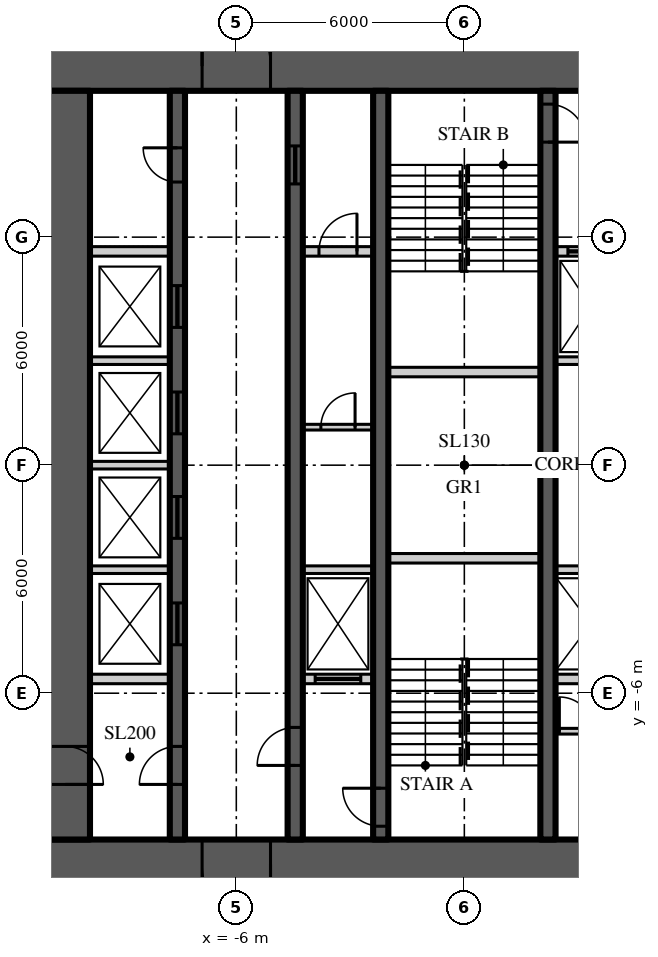
"""IFC4 building model, lengths in metres.
Left out: names, types, materials, properties, quantities, classifications, styles, units other than length and angle.
Written with IfcOpenShell. Run it as: python <this file> out.ifc"""

import sys

from ifc_helpers import new_model, si_unit, direction, frame, frame_2d, origin, place, context, subcontext, project, spatial, rectangle, extrude, element, fill, save


model = new_model("IFC4")
c1 = context("Model", 3, precision=1e-05, world=origin(), true_north=direction((0.0, 1.0)))
c2 = subcontext(c1, "Body", "Model", "MODEL_VIEW")
j1 = project(units=[si_unit("LENGTHUNIT", "METRE"), si_unit("PLANEANGLEUNIT", "RADIAN")], contexts=[c1])
p1 = place(None, origin())
s1 = spatial("IfcSite", under=j1, at=p1, CompositionType="ELEMENT")
p2 = place(p1, origin())
s2 = spatial("IfcBuilding", under=s1, at=p2, CompositionType="ELEMENT")
p3 = place(p2, frame((0.0, 0.0, 51.3)))
s3 = spatial("IfcBuildingStorey", under=s2, at=p3, CompositionType="ELEMENT", Elevation=51.3)
p4 = place(p3, frame((-11.15, 10.5, 0.0), z_axis=(0.0, 0.0, 1.0), x_axis=(1.0, 0.0, 0.0)))
e1 = element("IfcWall", 1, at=p4, inside=s3, PredefinedType="SHEAR", context=c2, shape_type="SweptSolid", body=[
    extrude(rectangle(XDim=22.3, YDim=1.3, at=frame_2d((11.15, 0.0))), origin(), (0.0, 0.0, 1.0), 3.9),
])
p5 = place(p4, frame((4.25, 0.0, 0.0)))
e2 = element("IfcOpeningElement", 2, at=p5, cuts=e1, PredefinedType="OPENING", context=c2, shape_type="SweptSolid", body=[
    extrude(rectangle(XDim=1.8, YDim=2.2, at=frame_2d((0.9, 1.1))), frame((0.0, 0.66, 0.0), z_axis=(0.0, -1.0, 0.0), x_axis=(1.0, 0.0, 0.0)), (0.0, 0.0, 1.0), 1.32),
])
p6 = place(p4, frame((16.25, 0.0, 0.0)))
e3 = element("IfcOpeningElement", 3, at=p6, cuts=e1, PredefinedType="OPENING", context=c2, shape_type="SweptSolid", body=[
    extrude(rectangle(XDim=1.8, YDim=2.2, at=frame_2d((0.9, 1.1))), frame((0.0, 0.66, 0.0), z_axis=(0.0, -1.0, 0.0), x_axis=(1.0, 0.0, 0.0)), (0.0, 0.0, 1.0), 1.32),
])
p7 = place(p3, frame((11.15, -10.5, 0.0), z_axis=(0.0, 0.0, 1.0), x_axis=(-1.0, 0.0, 0.0)))
e4 = element("IfcWall", 4, at=p7, inside=s3, PredefinedType="SHEAR", context=c2, shape_type="SweptSolid", body=[
    extrude(rectangle(XDim=22.3, YDim=1.3, at=frame_2d((11.15, 0.0))), origin(), (0.0, 0.0, 1.0), 3.9),
])
p8 = place(p7, frame((16.25, 0.0, 0.0)))
e5 = element("IfcOpeningElement", 5, at=p8, cuts=e4, PredefinedType="OPENING", context=c2, shape_type="SweptSolid", body=[
    extrude(rectangle(XDim=1.8, YDim=2.2, at=frame_2d((0.9, 1.1))), frame((0.0, 0.66, 0.0), z_axis=(0.0, -1.0, 0.0), x_axis=(1.0, 0.0, 0.0)), (0.0, 0.0, 1.0), 1.32),
])
p9 = place(p7, frame((4.25, 0.0, 0.0)))
e6 = element("IfcOpeningElement", 6, at=p9, cuts=e4, PredefinedType="OPENING", context=c2, shape_type="SweptSolid", body=[
    extrude(rectangle(XDim=1.8, YDim=2.2, at=frame_2d((0.9, 1.1))), frame((0.0, 0.66, 0.0), z_axis=(0.0, -1.0, 0.0), x_axis=(1.0, 0.0, 0.0)), (0.0, 0.0, 1.0), 1.32),
])
p10 = place(p3, frame((-10.5, 9.85, 0.0), z_axis=(0.0, 0.0, 1.0), x_axis=(0.0, -1.0, 0.0)))
e7 = element("IfcWall", 7, at=p10, inside=s3, PredefinedType="SHEAR", context=c2, shape_type="SweptSolid", body=[
    extrude(rectangle(XDim=19.7, YDim=1.3, at=frame_2d((9.85, 0.0))), origin(), (0.0, 0.0, 1.0), 3.9),
])
p11 = place(p10, frame((17.25, 0.0, 0.0)))
e8 = element("IfcOpeningElement", 8, at=p11, cuts=e7, PredefinedType="OPENING", context=c2, shape_type="SweptSolid", body=[
    extrude(rectangle(XDim=1.0, YDim=2.2, at=frame_2d((0.5, 1.1))), frame((0.0, 0.66, 0.0), z_axis=(0.0, -1.0, 0.0), x_axis=(1.0, 0.0, 0.0)), (0.0, 0.0, 1.0), 1.32),
])
p12 = place(p3, frame((-7.55, -9.85, 0.0), z_axis=(0.0, 0.0, 1.0), x_axis=(0.0, 1.0, 0.0)))
e9 = element("IfcWall", 9, at=p12, inside=s3, PredefinedType="SHEAR", context=c2, shape_type="SweptSolid", body=[
    extrude(rectangle(XDim=19.7, YDim=0.4, at=frame_2d((9.85, 0.0))), origin(), (0.0, 0.0, 1.0), 3.9),
])
p13 = place(p12, frame((1.45, 0.0, 0.0)))
e10 = element("IfcOpeningElement", 10, at=p13, cuts=e9, PredefinedType="OPENING", context=c2, shape_type="SweptSolid", body=[
    extrude(rectangle(XDim=1.0, YDim=2.2, at=frame_2d((0.5, 1.1))), frame((0.0, 0.21, 0.0), z_axis=(0.0, -1.0, 0.0), x_axis=(1.0, 0.0, 0.0)), (0.0, 0.0, 1.0), 0.42),
])
p14 = place(p12, frame((17.3, 0.0, 0.0)))
e11 = element("IfcOpeningElement", 11, at=p14, cuts=e9, PredefinedType="OPENING", context=c2, shape_type="SweptSolid", body=[
    extrude(rectangle(XDim=0.9, YDim=2.1, at=frame_2d((0.45, 1.05))), frame((0.0, 0.21, 0.0), z_axis=(0.0, -1.0, 0.0), x_axis=(1.0, 0.0, 0.0)), (0.0, 0.0, 1.0), 0.42),
])
p15 = place(p12, frame((5.125, 0.0, 0.0)))
e12 = element("IfcOpeningElement", 12, at=p15, cuts=e9, PredefinedType="OPENING", context=c2, shape_type="SweptSolid", body=[
    extrude(rectangle(XDim=1.1, YDim=2.2, at=frame_2d((0.55, 1.1))), frame((0.0, 0.21, 0.0), z_axis=(0.0, -1.0, 0.0), x_axis=(1.0, 0.0, 0.0)), (0.0, 0.0, 1.0), 0.42),
])
p16 = place(p12, frame((7.925, 0.0, 0.0)))
e13 = element("IfcOpeningElement", 13, at=p16, cuts=e9, PredefinedType="OPENING", context=c2, shape_type="SweptSolid", body=[
    extrude(rectangle(XDim=1.1, YDim=2.2, at=frame_2d((0.55, 1.1))), frame((0.0, 0.21, 0.0), z_axis=(0.0, -1.0, 0.0), x_axis=(1.0, 0.0, 0.0)), (0.0, 0.0, 1.0), 0.42),
])
p17 = place(p12, frame((10.675, 0.0, 0.0)))
e14 = element("IfcOpeningElement", 14, at=p17, cuts=e9, PredefinedType="OPENING", context=c2, shape_type="SweptSolid", body=[
    extrude(rectangle(XDim=1.1, YDim=2.2, at=frame_2d((0.55, 1.1))), frame((0.0, 0.21, 0.0), z_axis=(0.0, -1.0, 0.0), x_axis=(1.0, 0.0, 0.0)), (0.0, 0.0, 1.0), 0.42),
])
p18 = place(p12, frame((13.475, 0.0, 0.0)))
e15 = element("IfcOpeningElement", 15, at=p18, cuts=e9, PredefinedType="OPENING", context=c2, shape_type="SweptSolid", body=[
    extrude(rectangle(XDim=1.1, YDim=2.2, at=frame_2d((0.55, 1.1))), frame((0.0, 0.21, 0.0), z_axis=(0.0, -1.0, 0.0), x_axis=(1.0, 0.0, 0.0)), (0.0, 0.0, 1.0), 0.42),
])
p19 = place(p3, frame((-4.45, -9.85, 0.0), z_axis=(0.0, 0.0, 1.0), x_axis=(0.0, 1.0, 0.0)))
e16 = element("IfcWall", 16, at=p19, inside=s3, PredefinedType="SHEAR", context=c2, shape_type="SweptSolid", body=[
    extrude(rectangle(XDim=19.7, YDim=0.4, at=frame_2d((9.85, 0.0))), origin(), (0.0, 0.0, 1.0), 3.9),
])
p20 = place(p19, frame((1.95, 0.0, 0.0)))
e17 = element("IfcOpeningElement", 17, at=p20, cuts=e16, PredefinedType="OPENING", context=c2, shape_type="SweptSolid", body=[
    extrude(rectangle(XDim=1.0, YDim=2.2, at=frame_2d((0.5, 1.1))), frame((0.0, 0.21, 0.0), z_axis=(0.0, -1.0, 0.0), x_axis=(1.0, 0.0, 0.0)), (0.0, 0.0, 1.0), 0.42),
])
p21 = place(p19, frame((17.25, 0.0, 0.0)))
e18 = element("IfcOpeningElement", 18, at=p21, cuts=e16, PredefinedType="OPENING", context=c2, shape_type="SweptSolid", body=[
    extrude(rectangle(XDim=1.0, YDim=2.1, at=frame_2d((0.5, 1.05))), frame((0.0, 0.21, 0.0), z_axis=(0.0, -1.0, 0.0), x_axis=(1.0, 0.0, 0.0)), (0.0, 0.0, 1.0), 0.42),
])
p22 = place(p3, frame((-2.2, -9.85, 0.0), z_axis=(0.0, 0.0, 1.0), x_axis=(0.0, 1.0, 0.0)))
e19 = element("IfcWall", 19, at=p22, inside=s3, PredefinedType="SHEAR", context=c2, shape_type="SweptSolid", body=[
    extrude(rectangle(XDim=19.7, YDim=0.4, at=frame_2d((9.85, 0.0))), origin(), (0.0, 0.0, 1.0), 3.9),
])
p23 = place(p22, frame((0.35, 0.0, 0.0)))
e20 = element("IfcOpeningElement", 20, at=p23, cuts=e19, PredefinedType="OPENING", context=c2, shape_type="SweptSolid", body=[
    extrude(rectangle(XDim=1.0, YDim=2.2, at=frame_2d((0.5, 1.1))), frame((0.0, 0.21, 0.0), z_axis=(0.0, -1.0, 0.0), x_axis=(1.0, 0.0, 0.0)), (0.0, 0.0, 1.0), 0.42),
])
p24 = place(p3, frame((2.2, 9.85, 0.0), z_axis=(0.0, 0.0, 1.0), x_axis=(0.0, -1.0, 0.0)))
e21 = element("IfcWall", 21, at=p24, inside=s3, PredefinedType="SHEAR", context=c2, shape_type="SweptSolid", body=[
    extrude(rectangle(XDim=19.7, YDim=0.4, at=frame_2d((9.85, 0.0))), origin(), (0.0, 0.0, 1.0), 3.9),
])
p25 = place(p24, frame((0.35, 0.0, 0.0)))
e22 = element("IfcOpeningElement", 22, at=p25, cuts=e21, PredefinedType="OPENING", context=c2, shape_type="SweptSolid", body=[
    extrude(rectangle(XDim=1.0, YDim=2.2, at=frame_2d((0.5, 1.1))), frame((0.0, 0.21, 0.0), z_axis=(0.0, -1.0, 0.0), x_axis=(1.0, 0.0, 0.0)), (0.0, 0.0, 1.0), 0.42),
])
p26 = place(p3, frame((-9.85, 5.625, 0.0), z_axis=(0.0, 0.0, 1.0), x_axis=(1.0, 0.0, 0.0)))
e23 = element("IfcWall", 23, at=p26, inside=s3, PredefinedType="SOLIDWALL", context=c2, shape_type="SweptSolid", body=[
    extrude(rectangle(XDim=2.1, YDim=0.25, at=frame_2d((1.05, 0.0))), origin(), (0.0, 0.0, 1.0), 3.7),
])
p27 = place(p3, frame((-4.25, 5.625, 0.0), z_axis=(0.0, 0.0, 1.0), x_axis=(1.0, 0.0, 0.0)))
e24 = element("IfcWall", 24, at=p27, inside=s3, PredefinedType="SOLIDWALL", context=c2, shape_type="SweptSolid", body=[
    extrude(rectangle(XDim=1.85, YDim=0.25, at=frame_2d((0.925, 0.0))), origin(), (0.0, 0.0, 1.0), 3.7),
])
p28 = place(p27, frame((0.425, 0.0, 0.0)))
e25 = element("IfcOpeningElement", 25, at=p28, cuts=e24, PredefinedType="OPENING", context=c2, shape_type="SweptSolid", body=[
    extrude(rectangle(XDim=1.0, YDim=2.2, at=frame_2d((0.5, 1.1))), frame((0.0, 0.135, 0.0), z_axis=(0.0, -1.0, 0.0), x_axis=(1.0, 0.0, 0.0)), (0.0, 0.0, 1.0), 0.27),
])
p29 = place(p3, frame((2.4, 5.625, 0.0), z_axis=(0.0, 0.0, 1.0), x_axis=(1.0, 0.0, 0.0)))
e26 = element("IfcWall", 26, at=p29, inside=s3, PredefinedType="SOLIDWALL", context=c2, shape_type="SweptSolid", body=[
    extrude(rectangle(XDim=1.85, YDim=0.25, at=frame_2d((0.925, 0.0))), origin(), (0.0, 0.0, 1.0), 3.7),
])
p30 = place(p29, frame((0.325, 0.0, 0.0)))
e27 = element("IfcOpeningElement", 27, at=p30, cuts=e26, PredefinedType="OPENING", context=c2, shape_type="SweptSolid", body=[
    extrude(rectangle(XDim=1.2, YDim=2.2, at=frame_2d((0.6, 1.1))), frame((0.0, 0.135, 0.0), z_axis=(0.0, -1.0, 0.0), x_axis=(1.0, 0.0, 0.0)), (0.0, 0.0, 1.0), 0.27),
])
p31 = place(p3, frame((-9.85, -5.625, 0.0), z_axis=(0.0, 0.0, 1.0), x_axis=(1.0, 0.0, 0.0)))
e28 = element("IfcWall", 28, at=p31, inside=s3, PredefinedType="SOLIDWALL", context=c2, shape_type="SweptSolid", body=[
    extrude(rectangle(XDim=2.1, YDim=0.25, at=frame_2d((1.05, 0.0))), origin(), (0.0, 0.0, 1.0), 3.7),
])
p32 = place(p3, frame((-4.25, -5.625, 0.0), z_axis=(0.0, 0.0, 1.0), x_axis=(1.0, 0.0, 0.0)))
e29 = element("IfcWall", 29, at=p32, inside=s3, PredefinedType="SOLIDWALL", context=c2, shape_type="SweptSolid", body=[
    extrude(rectangle(XDim=1.85, YDim=0.25, at=frame_2d((0.925, 0.0))), origin(), (0.0, 0.0, 1.0), 3.7),
])
p33 = place(p32, frame((0.325, 0.0, 0.0)))
e30 = element("IfcOpeningElement", 30, at=p33, cuts=e29, PredefinedType="OPENING", context=c2, shape_type="SweptSolid", body=[
    extrude(rectangle(XDim=1.2, YDim=2.2, at=frame_2d((0.6, 1.1))), frame((0.0, 0.135, 0.0), z_axis=(0.0, -1.0, 0.0), x_axis=(1.0, 0.0, 0.0)), (0.0, 0.0, 1.0), 0.27),
])
p34 = place(p3, frame((2.4, -5.625, 0.0), z_axis=(0.0, 0.0, 1.0), x_axis=(1.0, 0.0, 0.0)))
e31 = element("IfcWall", 31, at=p34, inside=s3, PredefinedType="SOLIDWALL", context=c2, shape_type="SweptSolid", body=[
    extrude(rectangle(XDim=1.85, YDim=0.25, at=frame_2d((0.925, 0.0))), origin(), (0.0, 0.0, 1.0), 3.7),
])
for number, where, z_axis, x_axis in (
    (32, (-2.0, -2.45, 0.0), (0.0, 0.0, 1.0), (1.0, 0.0, 0.0)),
    (33, (-2.0, 2.45, 0.0), (0.0, 0.0, 1.0), (1.0, 0.0, 0.0)),
):
    element("IfcWall", number, at=place(p3, frame(where, z_axis=z_axis, x_axis=x_axis)), inside=s3, PredefinedType="SOLIDWALL", context=c2, shape_type="SweptSolid", body=[
        extrude(rectangle(XDim=4.0, YDim=0.25, at=frame_2d((2.0, 0.0))), origin(), (0.0, 0.0, 1.0), 3.7),
    ])
p35 = place(p3, frame((-9.85, -2.75, 0.0), z_axis=(0.0, 0.0, 1.0), x_axis=(1.0, 0.0, 0.0)))
e34 = element("IfcWall", 34, at=p35, inside=s3, PredefinedType="SOLIDWALL", context=c2, shape_type="SweptSolid", body=[
    extrude(rectangle(XDim=2.1, YDim=0.2, at=frame_2d((1.05, 0.0))), origin(), (0.0, 0.0, 1.0), 3.7),
])
for number, where, z_axis, x_axis in (
    (35, (-4.25, -2.75, 0.0), (0.0, 0.0, 1.0), (1.0, 0.0, 0.0)),
    (36, (2.4, -2.75, 0.0), (0.0, 0.0, 1.0), (1.0, 0.0, 0.0)),
):
    element("IfcWall", number, at=place(p3, frame(where, z_axis=z_axis, x_axis=x_axis)), inside=s3, PredefinedType="SOLIDWALL", context=c2, shape_type="SweptSolid", body=[
        extrude(rectangle(XDim=1.85, YDim=0.2, at=frame_2d((0.925, 0.0))), origin(), (0.0, 0.0, 1.0), 3.7),
    ])
for number, where, z_axis, x_axis in (
    (37, (-9.85, 0.0, 0.0), (0.0, 0.0, 1.0), (1.0, 0.0, 0.0)),
    (38, (-9.85, 2.75, 0.0), (0.0, 0.0, 1.0), (1.0, 0.0, 0.0)),
):
    element("IfcWall", number, at=place(p3, frame(where, z_axis=z_axis, x_axis=x_axis)), inside=s3, PredefinedType="SOLIDWALL", context=c2, shape_type="SweptSolid", body=[
        extrude(rectangle(XDim=2.1, YDim=0.2, at=frame_2d((1.05, 0.0))), origin(), (0.0, 0.0, 1.0), 3.7),
    ])
p36 = place(p3, frame((2.4, 2.75, 0.0), z_axis=(0.0, 0.0, 1.0), x_axis=(1.0, 0.0, 0.0)))
e39 = element("IfcWall", 39, at=p36, inside=s3, PredefinedType="SOLIDWALL", context=c2, shape_type="SweptSolid", body=[
    extrude(rectangle(XDim=1.85, YDim=0.2, at=frame_2d((0.925, 0.0))), origin(), (0.0, 0.0, 1.0), 3.7),
])
p37 = place(p3, frame((-4.25, 1.0, 0.0), z_axis=(0.0, 0.0, 1.0), x_axis=(1.0, 0.0, 0.0)))
e40 = element("IfcWall", 40, at=p37, inside=s3, PredefinedType="SOLIDWALL", context=c2, shape_type="SweptSolid", body=[
    extrude(rectangle(XDim=1.85, YDim=0.15, at=frame_2d((0.925, 0.0))), origin(), (0.0, 0.0, 1.0), 3.77),
])
p38 = place(p37, frame((0.475, 0.0, 0.0)))
e41 = element("IfcOpeningElement", 41, at=p38, cuts=e40, PredefinedType="OPENING", context=c2, shape_type="SweptSolid", body=[
    extrude(rectangle(XDim=0.9, YDim=2.1, at=frame_2d((0.45, 1.05))), frame((0.0, 0.085, 0.0), z_axis=(0.0, -1.0, 0.0), x_axis=(1.0, 0.0, 0.0)), (0.0, 0.0, 1.0), 0.17),
])
p39 = place(p3, frame((2.4, -7.0, 0.0), z_axis=(0.0, 0.0, 1.0), x_axis=(1.0, 0.0, 0.0)))
e42 = element("IfcWall", 42, at=p39, inside=s3, PredefinedType="SOLIDWALL", context=c2, shape_type="SweptSolid", body=[
    extrude(rectangle(XDim=1.85, YDim=0.15, at=frame_2d((0.925, 0.0))), origin(), (0.0, 0.0, 1.0), 3.77),
])
p40 = place(p39, frame((0.1, 0.0, 0.0)))
e43 = element("IfcOpeningElement", 43, at=p40, cuts=e42, PredefinedType="OPENING", context=c2, shape_type="SweptSolid", body=[
    extrude(rectangle(XDim=0.9, YDim=2.1, at=frame_2d((0.45, 1.05))), frame((0.0, 0.085, 0.0), z_axis=(0.0, -1.0, 0.0), x_axis=(1.0, 0.0, 0.0)), (0.0, 0.0, 1.0), 0.17),
])
p41 = place(p5, origin())
e44 = element("IfcDoor", 44, at=p41, inside=s3, OperationType="DOUBLE_DOOR_DOUBLE_SWING", PredefinedType="DOOR", context=c2, shape_type="SweptSolid", body=[
    extrude(rectangle(XDim=1.8, YDim=2.2, at=frame_2d((0.9, 1.1))), frame((0.0, 0.025, 0.0), z_axis=(0.0, -1.0, 0.0), x_axis=(1.0, 0.0, 0.0)), (0.0, 0.0, 1.0), 0.05),
])
fill(e2, e44)
p42 = place(p8, origin())
e45 = element("IfcDoor", 45, at=p42, inside=s3, OperationType="DOUBLE_DOOR_DOUBLE_SWING", PredefinedType="DOOR", context=c2, shape_type="SweptSolid", body=[
    extrude(rectangle(XDim=1.8, YDim=2.2, at=frame_2d((0.9, 1.1))), frame((0.0, 0.025, 0.0), z_axis=(0.0, -1.0, 0.0), x_axis=(1.0, 0.0, 0.0)), (0.0, 0.0, 1.0), 0.05),
])
fill(e5, e45)
p43 = place(p13, origin())
e46 = element("IfcDoor", 46, at=p43, inside=s3, OperationType="SINGLE_SWING_LEFT", PredefinedType="DOOR", context=c2, shape_type="SweptSolid", body=[
    extrude(rectangle(XDim=1.0, YDim=2.2, at=frame_2d((0.5, 1.1))), frame((0.0, 0.025, 0.0), z_axis=(0.0, -1.0, 0.0), x_axis=(1.0, 0.0, 0.0)), (0.0, 0.0, 1.0), 0.05),
])
fill(e10, e46)
p44 = place(p11, origin())
e47 = element("IfcDoor", 47, at=p44, inside=s3, OperationType="SINGLE_SWING_RIGHT", PredefinedType="DOOR", context=c2, shape_type="SweptSolid", body=[
    extrude(rectangle(XDim=1.0, YDim=2.2, at=frame_2d((0.5, 1.1))), frame((0.0, 0.025, 0.0), z_axis=(0.0, -1.0, 0.0), x_axis=(1.0, 0.0, 0.0)), (0.0, 0.0, 1.0), 0.05),
])
fill(e8, e47)
p45 = place(p20, origin())
e48 = element("IfcDoor", 48, at=p45, inside=s3, OperationType="SINGLE_SWING_LEFT", PredefinedType="DOOR", context=c2, shape_type="SweptSolid", body=[
    extrude(rectangle(XDim=1.0, YDim=2.2, at=frame_2d((0.5, 1.1))), frame((0.0, 0.025, 0.0), z_axis=(0.0, -1.0, 0.0), x_axis=(1.0, 0.0, 0.0)), (0.0, 0.0, 1.0), 0.05),
])
fill(e17, e48)
p46 = place(p23, origin())
e49 = element("IfcDoor", 49, at=p46, inside=s3, OperationType="SINGLE_SWING_RIGHT", PredefinedType="DOOR", context=c2, shape_type="SweptSolid", body=[
    extrude(rectangle(XDim=1.0, YDim=2.2, at=frame_2d((0.5, 1.1))), frame((0.0, 0.025, 0.0), z_axis=(0.0, -1.0, 0.0), x_axis=(1.0, 0.0, 0.0)), (0.0, 0.0, 1.0), 0.05),
])
fill(e20, e49)
p47 = place(p25, origin())
e50 = element("IfcDoor", 50, at=p47, inside=s3, OperationType="SINGLE_SWING_RIGHT", PredefinedType="DOOR", context=c2, shape_type="SweptSolid", body=[
    extrude(rectangle(XDim=1.0, YDim=2.2, at=frame_2d((0.5, 1.1))), frame((0.0, 0.025, 0.0), z_axis=(0.0, -1.0, 0.0), x_axis=(1.0, 0.0, 0.0)), (0.0, 0.0, 1.0), 0.05),
])
fill(e22, e50)
p48 = place(p14, origin())
e51 = element("IfcDoor", 51, at=p48, inside=s3, OperationType="SINGLE_SWING_RIGHT", PredefinedType="DOOR", context=c2, shape_type="SweptSolid", body=[
    extrude(rectangle(XDim=0.9, YDim=2.1, at=frame_2d((0.45, 1.05))), frame((0.0, 0.025, 0.0), z_axis=(0.0, -1.0, 0.0), x_axis=(1.0, 0.0, 0.0)), (0.0, 0.0, 1.0), 0.05),
])
fill(e11, e51)
p49 = place(p21, origin())
e52 = element("IfcDoor", 52, at=p49, inside=s3, OperationType="SLIDING_TO_LEFT", PredefinedType="DOOR", context=c2, shape_type="SweptSolid", body=[
    extrude(rectangle(XDim=1.0, YDim=2.1, at=frame_2d((0.5, 1.05))), frame((0.0, 0.025, 0.0), z_axis=(0.0, -1.0, 0.0), x_axis=(1.0, 0.0, 0.0)), (0.0, 0.0, 1.0), 0.05),
])
fill(e18, e52)
p50 = place(p15, origin())
e53 = element("IfcDoor", 53, at=p50, inside=s3, OperationType="SLIDING_TO_LEFT", PredefinedType="DOOR", context=c2, shape_type="SweptSolid", body=[
    extrude(rectangle(XDim=1.1, YDim=2.2, at=frame_2d((0.55, 1.1))), frame((0.0, 0.025, 0.0), z_axis=(0.0, -1.0, 0.0), x_axis=(1.0, 0.0, 0.0)), (0.0, 0.0, 1.0), 0.05),
])
fill(e12, e53)
p51 = place(p16, origin())
e54 = element("IfcDoor", 54, at=p51, inside=s3, OperationType="SLIDING_TO_LEFT", PredefinedType="DOOR", context=c2, shape_type="SweptSolid", body=[
    extrude(rectangle(XDim=1.1, YDim=2.2, at=frame_2d((0.55, 1.1))), frame((0.0, 0.025, 0.0), z_axis=(0.0, -1.0, 0.0), x_axis=(1.0, 0.0, 0.0)), (0.0, 0.0, 1.0), 0.05),
])
fill(e13, e54)
p52 = place(p17, origin())
e55 = element("IfcDoor", 55, at=p52, inside=s3, OperationType="SLIDING_TO_LEFT", PredefinedType="DOOR", context=c2, shape_type="SweptSolid", body=[
    extrude(rectangle(XDim=1.1, YDim=2.2, at=frame_2d((0.55, 1.1))), frame((0.0, 0.025, 0.0), z_axis=(0.0, -1.0, 0.0), x_axis=(1.0, 0.0, 0.0)), (0.0, 0.0, 1.0), 0.05),
])
fill(e14, e55)
p53 = place(p18, origin())
e56 = element("IfcDoor", 56, at=p53, inside=s3, OperationType="SLIDING_TO_LEFT", PredefinedType="DOOR", context=c2, shape_type="SweptSolid", body=[
    extrude(rectangle(XDim=1.1, YDim=2.2, at=frame_2d((0.55, 1.1))), frame((0.0, 0.025, 0.0), z_axis=(0.0, -1.0, 0.0), x_axis=(1.0, 0.0, 0.0)), (0.0, 0.0, 1.0), 0.05),
])
fill(e15, e56)
p54 = place(p33, origin())
e57 = element("IfcDoor", 57, at=p54, inside=s3, OperationType="SLIDING_TO_LEFT", PredefinedType="DOOR", context=c2, shape_type="SweptSolid", body=[
    extrude(rectangle(XDim=1.2, YDim=2.2, at=frame_2d((0.6, 1.1))), frame((0.0, 0.025, 0.0), z_axis=(0.0, -1.0, 0.0), x_axis=(1.0, 0.0, 0.0)), (0.0, 0.0, 1.0), 0.05),
])
fill(e30, e57)
p55 = place(p30, origin())
e58 = element("IfcDoor", 58, at=p55, inside=s3, OperationType="SLIDING_TO_LEFT", PredefinedType="DOOR", context=c2, shape_type="SweptSolid", body=[
    extrude(rectangle(XDim=1.2, YDim=2.2, at=frame_2d((0.6, 1.1))), frame((0.0, 0.025, 0.0), z_axis=(0.0, -1.0, 0.0), x_axis=(1.0, 0.0, 0.0)), (0.0, 0.0, 1.0), 0.05),
])
fill(e27, e58)
p56 = place(p38, origin())
e59 = element("IfcDoor", 59, at=p56, inside=s3, OperationType="SINGLE_SWING_RIGHT", PredefinedType="DOOR", context=c2, shape_type="SweptSolid", body=[
    extrude(rectangle(XDim=0.9, YDim=2.1, at=frame_2d((0.45, 1.05))), frame((0.0, 0.025, 0.0), z_axis=(0.0, -1.0, 0.0), x_axis=(1.0, 0.0, 0.0)), (0.0, 0.0, 1.0), 0.05),
])
fill(e41, e59)
p57 = place(p28, origin())
e60 = element("IfcDoor", 60, at=p57, inside=s3, OperationType="SINGLE_SWING_RIGHT", PredefinedType="DOOR", context=c2, shape_type="SweptSolid", body=[
    extrude(rectangle(XDim=1.0, YDim=2.2, at=frame_2d((0.5, 1.1))), frame((0.0, 0.025, 0.0), z_axis=(0.0, -1.0, 0.0), x_axis=(1.0, 0.0, 0.0)), (0.0, 0.0, 1.0), 0.05),
])
fill(e25, e60)
p58 = place(p40, origin())
e61 = element("IfcDoor", 61, at=p58, inside=s3, OperationType="SINGLE_SWING_LEFT", PredefinedType="DOOR", context=c2, shape_type="SweptSolid", body=[
    extrude(rectangle(XDim=0.9, YDim=2.1, at=frame_2d((0.45, 1.05))), frame((0.0, 0.025, 0.0), z_axis=(0.0, -1.0, 0.0), x_axis=(1.0, 0.0, 0.0)), (0.0, 0.0, 1.0), 0.05),
])
fill(e43, e61)
save(model, sys.argv[1])
